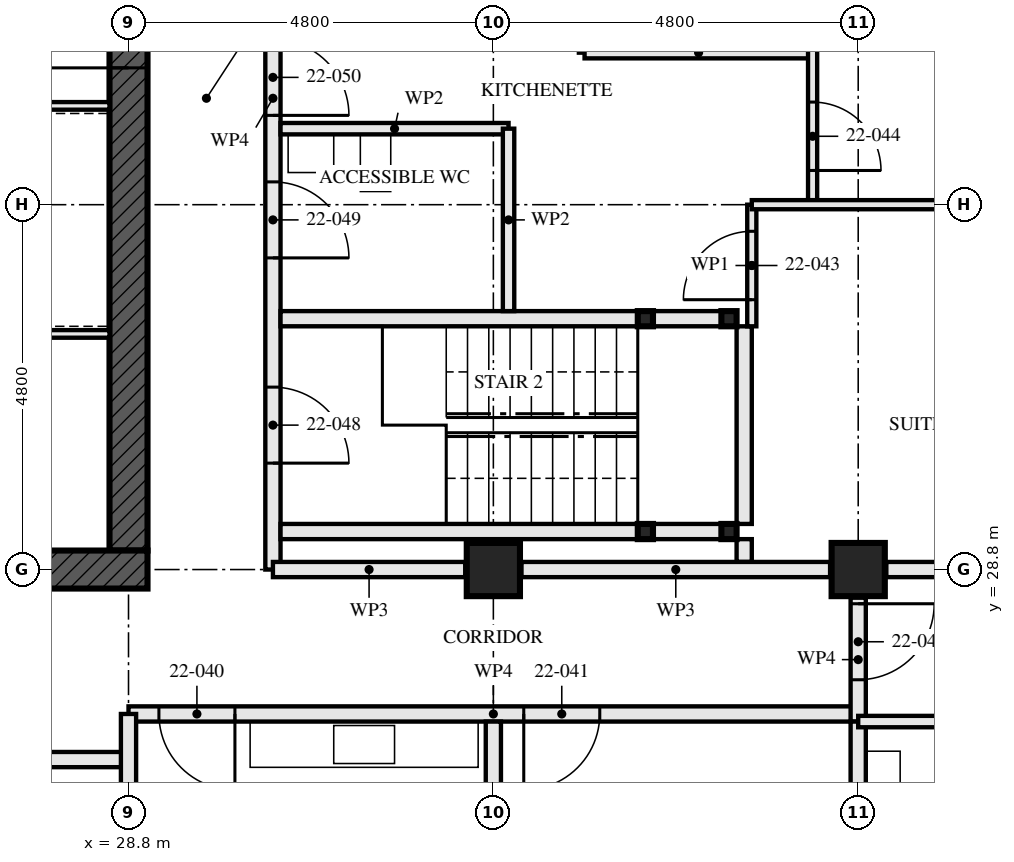
"""IFC4 building model, lengths in metres.
Left out: names, types, materials, properties, quantities, classifications, styles, units other than length and angle.
Written with IfcOpenShell. Run it as: python <this file> out.ifc"""

import sys

from ifc_helpers import new_model, si_unit, direction, frame, frame_2d, origin, origin_2d, place, context, subcontext, project, spatial, rectangle, hollow_rectangle, extrude, element, fill, save


model = new_model("IFC4")
c1 = context("Model", 3, precision=1e-05, world=origin(), true_north=direction((0.0, 1.0)))
c2 = subcontext(c1, "Body", "Model", "MODEL_VIEW")
j1 = project(units=[si_unit("LENGTHUNIT", "METRE"), si_unit("PLANEANGLEUNIT", "RADIAN")], contexts=[c1])
p1 = place(None, origin())
s1 = spatial("IfcSite", under=j1, at=p1, CompositionType="ELEMENT")
p2 = place(p1, origin())
s2 = spatial("IfcBuilding", under=s1, at=p2, CompositionType="ELEMENT")
p3 = place(p2, frame((0.0, 0.0, 84.0)))
s3 = spatial("IfcBuildingStorey", under=s2, at=p3, CompositionType="ELEMENT", Elevation=84.0)
for number, where, z_axis, x_axis in (
    (1, (33.6, 28.8, 0.0), (0.0, 0.0, 1.0), (0.0, 1.0, 0.0)),
    (2, (38.4, 28.8, 0.0), (0.0, 0.0, 1.0), (0.0, 1.0, 0.0)),
):
    element("IfcColumn", number, at=place(p3, frame(where, z_axis=z_axis, x_axis=x_axis)), inside=s3, PredefinedType="COLUMN", context=c2, shape_type="SweptSolid", body=[
        extrude(hollow_rectangle(XDim=0.7, YDim=0.7, WallThickness=0.06, at=origin_2d()), origin(), (0.0, 0.0, 1.0), 3.5),
    ])
p4 = place(p3, frame((14.15, 28.8, -0.17), z_axis=(0.0, 0.0, 1.0), x_axis=(1.0, 0.0, 0.0)))
e3 = element("IfcWall", 3, at=p4, inside=s3, PredefinedType="SHEAR", context=c2, shape_type="SweptSolid", body=[
    extrude(rectangle(XDim=14.9, YDim=0.5, at=frame_2d((7.45, 0.0))), origin(), (0.0, 0.0, 1.0), 3.5),
])
p5 = place(p4, frame((6.85, 0.0, 0.17)))
e4 = element("IfcOpeningElement", 4, at=p5, cuts=e3, PredefinedType="OPENING", context=c2, shape_type="SweptSolid", body=[
    extrude(rectangle(XDim=1.2, YDim=2.1, at=frame_2d((0.6, 1.05))), frame((0.0, 0.26, 0.0), z_axis=(0.0, -1.0, 0.0), x_axis=(1.0, 0.0, 0.0)), (0.0, 0.0, 1.0), 0.521),
])
p6 = place(p3, frame((28.8, 29.05, -0.17), z_axis=(0.0, 0.0, 1.0), x_axis=(0.0, 1.0, 0.0)))
e5 = element("IfcWall", 5, at=p6, inside=s3, PredefinedType="SHEAR", context=c2, shape_type="SweptSolid", body=[
    extrude(rectangle(XDim=13.9, YDim=0.5, at=frame_2d((6.95, 0.0))), origin(), (0.0, 0.0, 1.0), 3.5),
])
p7 = place(p6, frame((6.35, 0.0, 0.17)))
e6 = element("IfcOpeningElement", 6, at=p7, cuts=e5, PredefinedType="OPENING", context=c2, shape_type="SweptSolid", body=[
    extrude(rectangle(XDim=1.2, YDim=2.1, at=frame_2d((0.6, 1.05))), frame((0.0, 0.26, 0.0), z_axis=(0.0, -1.0, 0.0), x_axis=(1.0, 0.0, 0.0)), (0.0, 0.0, 1.0), 0.521),
])
for number, where, z_axis, x_axis in (
    (7, (36.7, 29.3, 0.0), (0.0, 0.0, 1.0), (1.0, 0.0, 0.0)),
    (8, (36.7, 32.1, 0.0), (0.0, 0.0, 1.0), (1.0, 0.0, 0.0)),
    (9, (35.6, 29.3, 0.0), (0.0, 0.0, 1.0), (1.0, 0.0, 0.0)),
    (10, (35.6, 32.1, 0.0), (0.0, 0.0, 1.0), (1.0, 0.0, 0.0)),
):
    element("IfcColumn", number, at=place(p3, frame(where, z_axis=z_axis, x_axis=x_axis)), inside=s3, PredefinedType="COLUMN", context=c2, shape_type="SweptSolid", body=[
        extrude(hollow_rectangle(XDim=0.2, YDim=0.2, WallThickness=0.008, at=origin_2d()), origin(), (0.0, 0.0, 1.0), 3.33),
    ])
p8 = place(p3, frame((17.8, 26.3, 0.0), z_axis=(0.0, 0.0, 1.0), x_axis=(1.0, 0.0, 0.0)))
e11 = element("IfcWall", 11, at=p8, inside=s3, PredefinedType="PARTITIONING", context=c2, shape_type="SweptSolid", body=[
    extrude(rectangle(XDim=11.0, YDim=0.2, at=frame_2d((5.5, 0.0))), origin(), (0.0, 0.0, 1.0), 2.55),
])
p9 = place(p8, frame((0.25, 0.0, 0.0)))
e12 = element("IfcOpeningElement", 12, at=p9, cuts=e11, PredefinedType="OPENING", context=c2, shape_type="SweptSolid", body=[
    extrude(rectangle(XDim=0.9, YDim=2.1, at=frame_2d((0.45, 1.05))), frame((0.0, 0.111, 0.0), z_axis=(0.0, -1.0, 0.0), x_axis=(1.0, 0.0, 0.0)), (0.0, 0.0, 1.0), 0.221),
])
p10 = place(p8, frame((1.8, 0.0, 0.0)))
e13 = element("IfcOpeningElement", 13, at=p10, cuts=e11, PredefinedType="OPENING", context=c2, shape_type="SweptSolid", body=[
    extrude(rectangle(XDim=1.0, YDim=2.1, at=frame_2d((0.5, 1.05))), frame((0.0, 0.111, 0.0), z_axis=(0.0, -1.0, 0.0), x_axis=(1.0, 0.0, 0.0)), (0.0, 0.0, 1.0), 0.221),
])
p11 = place(p8, frame((6.6, 0.0, 0.0)))
e14 = element("IfcOpeningElement", 14, at=p11, cuts=e11, PredefinedType="OPENING", context=c2, shape_type="SweptSolid", body=[
    extrude(rectangle(XDim=1.0, YDim=2.1, at=frame_2d((0.5, 1.05))), frame((0.0, 0.111, 0.0), z_axis=(0.0, -1.0, 0.0), x_axis=(1.0, 0.0, 0.0)), (0.0, 0.0, 1.0), 0.221),
])
p12 = place(p3, frame((33.6, 14.647, 0.0), z_axis=(0.0, 0.0, 1.0), x_axis=(0.0, 1.0, 0.0)))
e15 = element("IfcWall", 15, at=p12, inside=s3, PredefinedType="PARTITIONING", context=c2, shape_type="SweptSolid", body=[
    extrude(rectangle(XDim=12.153, YDim=0.2, at=frame_2d((6.077, 0.0))), origin(), (0.0, 0.0, 1.0), 2.55),
])
p13 = place(p3, frame((38.4, 19.52, 0.0), z_axis=(0.0, 0.0, 1.0), x_axis=(0.0, 1.0, 0.0)))
e16 = element("IfcWall", 16, at=p13, inside=s3, PredefinedType="PARTITIONING", context=c2, shape_type="SweptSolid", body=[
    extrude(rectangle(XDim=7.28, YDim=0.2, at=frame_2d((3.64, 0.0))), origin(), (0.0, 0.0, 1.0), 2.55),
])
p14 = place(p3, frame((38.4, 26.8, 0.0), z_axis=(0.0, 0.0, 1.0), x_axis=(1.0, 0.0, 0.0)))
e17 = element("IfcWall", 17, at=p14, inside=s3, PredefinedType="PARTITIONING", context=c2, shape_type="SweptSolid", body=[
    extrude(rectangle(XDim=2.8, YDim=0.15, at=frame_2d((1.4, 0.0))), origin(), (0.0, 0.0, 1.0), 3.33),
])
p15 = place(p3, frame((28.8, 26.9, 0.0), z_axis=(0.0, 0.0, 1.0), x_axis=(1.0, 0.0, 0.0)))
e18 = element("IfcWall", 18, at=p15, inside=s3, PredefinedType="PARTITIONING", context=c2, shape_type="SweptSolid", body=[
    extrude(rectangle(XDim=9.6, YDim=0.2, at=frame_2d((4.8, 0.0))), origin(), (0.0, 0.0, 1.0), 3.33),
])
p16 = place(p15, frame((0.4, 0.0, 0.0)))
e19 = element("IfcOpeningElement", 19, at=p16, cuts=e18, PredefinedType="OPENING", context=c2, shape_type="SweptSolid", body=[
    extrude(rectangle(XDim=1.0, YDim=2.1, at=frame_2d((0.5, 1.05))), frame((0.0, 0.111, 0.0), z_axis=(0.0, -1.0, 0.0), x_axis=(1.0, 0.0, 0.0)), (0.0, 0.0, 1.0), 0.221),
])
p17 = place(p15, frame((5.2, 0.0, 0.0)))
e20 = element("IfcOpeningElement", 20, at=p17, cuts=e18, PredefinedType="OPENING", context=c2, shape_type="SweptSolid", body=[
    extrude(rectangle(XDim=1.0, YDim=2.1, at=frame_2d((0.5, 1.05))), frame((0.0, 0.111, 0.0), z_axis=(0.0, -1.0, 0.0), x_axis=(1.0, 0.0, 0.0)), (0.0, 0.0, 1.0), 0.221),
])
p18 = place(p3, frame((38.4, 26.8, 0.0), z_axis=(0.0, 0.0, 1.0), x_axis=(0.0, 1.0, 0.0)))
e21 = element("IfcWall", 21, at=p18, inside=s3, PredefinedType="PARTITIONING", context=c2, shape_type="SweptSolid", body=[
    extrude(rectangle(XDim=1.63, YDim=0.2, at=frame_2d((0.815, 0.0))), origin(), (0.0, 0.0, 1.0), 3.33),
])
p19 = place(p18, frame((0.55, 0.0, 0.0)))
e22 = element("IfcOpeningElement", 22, at=p19, cuts=e21, PredefinedType="OPENING", context=c2, shape_type="SweptSolid", body=[
    extrude(rectangle(XDim=1.0, YDim=2.1, at=frame_2d((0.5, 1.05))), frame((0.0, 0.111, 0.0), z_axis=(0.0, -1.0, 0.0), x_axis=(1.0, 0.0, 0.0)), (0.0, 0.0, 1.0), 0.221),
])
p20 = place(p3, frame((36.6, 29.3, 0.0), z_axis=(0.0, 0.0, 1.0), x_axis=(-1.0, 0.0, 0.0)))
e23 = element("IfcWall", 23, at=p20, inside=s3, PredefinedType="SOLIDWALL", context=c2, shape_type="SweptSolid", body=[
    extrude(rectangle(XDim=0.9, YDim=0.2, at=frame_2d((0.45, 0.0))), origin(), (0.0, 0.0, 1.0), 2.99),
])
p21 = place(p3, frame((35.5, 29.3, 0.0), z_axis=(0.0, 0.0, 1.0), x_axis=(-1.0, 0.0, 0.0)))
e24 = element("IfcWall", 24, at=p21, inside=s3, PredefinedType="SOLIDWALL", context=c2, shape_type="SweptSolid", body=[
    extrude(rectangle(XDim=4.7, YDim=0.2, at=frame_2d((2.35, 0.0))), origin(), (0.0, 0.0, 1.0), 2.99),
])
p22 = place(p3, frame((36.6, 32.1, 0.0), z_axis=(0.0, 0.0, 1.0), x_axis=(-1.0, 0.0, 0.0)))
e25 = element("IfcWall", 25, at=p22, inside=s3, PredefinedType="SOLIDWALL", context=c2, shape_type="SweptSolid", body=[
    extrude(rectangle(XDim=0.9, YDim=0.2, at=frame_2d((0.45, 0.0))), origin(), (0.0, 0.0, 1.0), 2.99),
])
p23 = place(p3, frame((35.5, 32.1, 0.0), z_axis=(0.0, 0.0, 1.0), x_axis=(-1.0, 0.0, 0.0)))
e26 = element("IfcWall", 26, at=p23, inside=s3, PredefinedType="SOLIDWALL", context=c2, shape_type="SweptSolid", body=[
    extrude(rectangle(XDim=4.7, YDim=0.2, at=frame_2d((2.35, 0.0))), origin(), (0.0, 0.0, 1.0), 2.99),
])
p24 = place(p3, frame((36.9, 28.9, 0.0), z_axis=(0.0, 0.0, 1.0), x_axis=(0.0, 1.0, 0.0)))
e27 = element("IfcWall", 27, at=p24, inside=s3, PredefinedType="SOLIDWALL", context=c2, shape_type="SweptSolid", body=[
    extrude(rectangle(XDim=0.3, YDim=0.2, at=frame_2d((0.15, 0.0))), origin(), (0.0, 0.0, 1.0), 3.33),
])
p25 = place(p3, frame((36.9, 29.4, 0.0), z_axis=(0.0, 0.0, 1.0), x_axis=(0.0, 1.0, 0.0)))
e28 = element("IfcWall", 28, at=p25, inside=s3, PredefinedType="SOLIDWALL", context=c2, shape_type="SweptSolid", body=[
    extrude(rectangle(XDim=2.6, YDim=0.2, at=frame_2d((1.3, 0.0))), origin(), (0.0, 0.0, 1.0), 3.33),
])
p26 = place(p3, frame((33.8, 32.2, 0.0), z_axis=(0.0, 0.0, 1.0), x_axis=(0.0, 1.0, 0.0)))
e29 = element("IfcWall", 29, at=p26, inside=s3, PredefinedType="PARTITIONING", context=c2, shape_type="SweptSolid", body=[
    extrude(rectangle(XDim=2.4, YDim=0.15, at=frame_2d((1.2, 0.0))), origin(), (0.0, 0.0, 1.0), 2.55),
])
for number, where, z_axis, x_axis in (
    (30, (33.8, 34.6, 0.0), (0.0, 0.0, 1.0), (-1.0, 0.0, 0.0)),
    (31, (37.8, 35.6, 0.0), (0.0, 0.0, 1.0), (-1.0, 0.0, 0.0)),
):
    element("IfcWall", number, at=place(p3, frame(where, z_axis=z_axis, x_axis=x_axis)), inside=s3, PredefinedType="PARTITIONING", context=c2, shape_type="SweptSolid", body=[
        extrude(rectangle(XDim=3.0, YDim=0.15, at=frame_2d((1.5, 0.0))), origin(), (0.0, 0.0, 1.0), 3.33),
    ])
p27 = place(p3, frame((37.0, 32.0, 0.0), z_axis=(0.0, 0.0, 1.0), x_axis=(0.0, 1.0, 0.0)))
e32 = element("IfcWall", 32, at=p27, inside=s3, PredefinedType="PARTITIONING", context=c2, shape_type="SweptSolid", body=[
    extrude(rectangle(XDim=1.6, YDim=0.12, at=frame_2d((0.8, 0.0))), origin(), (0.0, 0.0, 1.0), 3.33),
])
p28 = place(p27, frame((0.35, 0.0, 0.0)))
e33 = element("IfcOpeningElement", 33, at=p28, cuts=e32, PredefinedType="OPENING", context=c2, shape_type="SweptSolid", body=[
    extrude(rectangle(XDim=0.9, YDim=2.1, at=frame_2d((0.45, 1.05))), frame((0.0, 0.071, 0.0), z_axis=(0.0, -1.0, 0.0), x_axis=(1.0, 0.0, 0.0)), (0.0, 0.0, 1.0), 0.141),
])
p29 = place(p3, frame((37.8, 33.6, 0.0), z_axis=(0.0, 0.0, 1.0), x_axis=(0.0, 1.0, 0.0)))
e34 = element("IfcWall", 34, at=p29, inside=s3, PredefinedType="PARTITIONING", context=c2, shape_type="SweptSolid", body=[
    extrude(rectangle(XDim=4.8, YDim=0.12, at=frame_2d((2.4, 0.0))), origin(), (0.0, 0.0, 1.0), 3.33),
])
p30 = place(p29, frame((0.45, 0.0, 0.0)))
e35 = element("IfcOpeningElement", 35, at=p30, cuts=e34, PredefinedType="OPENING", context=c2, shape_type="SweptSolid", body=[
    extrude(rectangle(XDim=0.9, YDim=2.1, at=frame_2d((0.45, 1.05))), frame((0.0, 0.071, 0.0), z_axis=(0.0, -1.0, 0.0), x_axis=(1.0, 0.0, 0.0)), (0.0, 0.0, 1.0), 0.141),
])
p31 = place(p29, frame((2.925, 0.0, 0.0)))
e36 = element("IfcOpeningElement", 36, at=p31, cuts=e34, PredefinedType="OPENING", context=c2, shape_type="SweptSolid", body=[
    extrude(rectangle(XDim=0.95, YDim=2.1, at=frame_2d((0.475, 1.05))), frame((0.0, 0.071, 0.0), z_axis=(0.0, -1.0, 0.0), x_axis=(1.0, 0.0, 0.0)), (0.0, 0.0, 1.0), 0.141),
])
p32 = place(p3, frame((42.855, 33.6, 0.0), z_axis=(0.0, 0.0, 1.0), x_axis=(-1.0, 0.0, 0.0)))
e37 = element("IfcWall", 37, at=p32, inside=s3, PredefinedType="PARTITIONING", context=c2, shape_type="SweptSolid", body=[
    extrude(rectangle(XDim=5.855, YDim=0.12, at=frame_2d((2.927, 0.0))), origin(), (0.0, 0.0, 1.0), 2.55),
])
p33 = place(p3, frame((30.7, 28.8, 0.0), z_axis=(0.0, 0.0, 1.0), x_axis=(0.0, 1.0, 0.0)))
e38 = element("IfcWall", 38, at=p33, inside=s3, PredefinedType="PARTITIONING", context=c2, shape_type="SweptSolid", body=[
    extrude(rectangle(XDim=12.4, YDim=0.2, at=frame_2d((6.2, 0.0))), origin(), (0.0, 0.0, 1.0), 2.55),
])
p34 = place(p33, frame((1.4, 0.0, 0.0)))
e39 = element("IfcOpeningElement", 39, at=p34, cuts=e38, PredefinedType="OPENING", context=c2, shape_type="SweptSolid", body=[
    extrude(rectangle(XDim=1.0, YDim=2.1, at=frame_2d((0.5, 1.05))), frame((0.0, 0.111, 0.0), z_axis=(0.0, -1.0, 0.0), x_axis=(1.0, 0.0, 0.0)), (0.0, 0.0, 1.0), 0.221),
])
p35 = place(p33, frame((4.1, 0.0, 0.0)))
e40 = element("IfcOpeningElement", 40, at=p35, cuts=e38, PredefinedType="OPENING", context=c2, shape_type="SweptSolid", body=[
    extrude(rectangle(XDim=1.0, YDim=2.1, at=frame_2d((0.5, 1.05))), frame((0.0, 0.111, 0.0), z_axis=(0.0, -1.0, 0.0), x_axis=(1.0, 0.0, 0.0)), (0.0, 0.0, 1.0), 0.221),
])
p36 = place(p33, frame((5.975, 0.0, 0.0)))
e41 = element("IfcOpeningElement", 41, at=p36, cuts=e38, PredefinedType="OPENING", context=c2, shape_type="SweptSolid", body=[
    extrude(rectangle(XDim=1.0, YDim=2.1, at=frame_2d((0.5, 1.05))), frame((0.0, 0.111, 0.0), z_axis=(0.0, -1.0, 0.0), x_axis=(1.0, 0.0, 0.0)), (0.0, 0.0, 1.0), 0.221),
])
p37 = place(p3, frame((23.05, 34.9, 0.0), z_axis=(0.0, 0.0, 1.0), x_axis=(1.0, 0.0, 0.0)))
e42 = element("IfcWall", 42, at=p37, inside=s3, PredefinedType="SOLIDWALL", context=c2, shape_type="SweptSolid", body=[
    extrude(rectangle(XDim=5.5, YDim=0.1, at=frame_2d((2.75, 0.0))), origin(), (0.0, 0.0, 1.0), 3.33),
])
p38 = place(p3, frame((23.15, 31.9, 0.0), z_axis=(0.0, 0.0, 1.0), x_axis=(1.0, 0.0, 0.0)))
e43 = element("IfcWall", 43, at=p38, inside=s3, PredefinedType="SOLIDWALL", context=c2, shape_type="SweptSolid", body=[
    extrude(rectangle(XDim=5.4, YDim=0.1, at=frame_2d((2.7, 0.0))), origin(), (0.0, 0.0, 1.0), 3.33),
])
p39 = place(p3, frame((28.8, 24.37, 0.0), z_axis=(0.0, 0.0, 1.0), x_axis=(0.0, 1.0, 0.0)))
e44 = element("IfcWall", 44, at=p39, inside=s3, PredefinedType="PARTITIONING", context=c2, shape_type="SweptSolid", body=[
    extrude(rectangle(XDim=2.53, YDim=0.2, at=frame_2d((1.265, 0.0))), origin(), (0.0, 0.0, 1.0), 2.32),
])
p40 = place(p3, frame((42.896, 28.8, 0.0), z_axis=(0.0, 0.0, 1.0), x_axis=(-1.0, 0.0, 0.0)))
e45 = element("IfcWall", 45, at=p40, inside=s3, PredefinedType="PARTITIONING", context=c2, shape_type="SweptSolid", body=[
    extrude(rectangle(XDim=4.125, YDim=0.2, at=frame_2d((2.063, 0.0))), origin(), (0.0, 0.0, 1.0), 2.32),
])
p41 = place(p3, frame((38.03, 28.8, 0.0), z_axis=(0.0, 0.0, 1.0), x_axis=(-1.0, 0.0, 0.0)))
e46 = element("IfcWall", 46, at=p41, inside=s3, PredefinedType="PARTITIONING", context=c2, shape_type="SweptSolid", body=[
    extrude(rectangle(XDim=4.06, YDim=0.2, at=frame_2d((2.03, 0.0))), origin(), (0.0, 0.0, 1.0), 2.32),
])
p42 = place(p3, frame((33.23, 28.8, 0.0), z_axis=(0.0, 0.0, 1.0), x_axis=(-1.0, 0.0, 0.0)))
e47 = element("IfcWall", 47, at=p42, inside=s3, PredefinedType="PARTITIONING", context=c2, shape_type="SweptSolid", body=[
    extrude(rectangle(XDim=2.53, YDim=0.2, at=frame_2d((1.265, 0.0))), origin(), (0.0, 0.0, 1.0), 2.32),
])
p43 = place(p16, frame((1.0, 0.0, 0.0), z_axis=(0.0, 0.0, 1.0), x_axis=(-1.0, 0.0, 0.0)))
e48 = element("IfcDoor", 48, at=p43, inside=s3, OperationType="SINGLE_SWING_RIGHT", PredefinedType="DOOR", context=c2, shape_type="SweptSolid", body=[
    extrude(rectangle(XDim=1.0, YDim=2.1, at=frame_2d((0.5, 1.05))), frame((0.0, 0.027, 0.0), z_axis=(0.0, -1.0, 0.0), x_axis=(1.0, 0.0, 0.0)), (0.0, 0.0, 1.0), 0.054),
])
fill(e19, e48)
p44 = place(p17, frame((1.0, 0.0, 0.0), z_axis=(0.0, 0.0, 1.0), x_axis=(-1.0, 0.0, 0.0)))
e49 = element("IfcDoor", 49, at=p44, inside=s3, OperationType="SINGLE_SWING_LEFT", PredefinedType="DOOR", context=c2, shape_type="SweptSolid", body=[
    extrude(rectangle(XDim=1.0, YDim=2.1, at=frame_2d((0.5, 1.05))), frame((0.0, 0.027, 0.0), z_axis=(0.0, -1.0, 0.0), x_axis=(1.0, 0.0, 0.0)), (0.0, 0.0, 1.0), 0.054),
])
fill(e20, e49)
p45 = place(p19, frame((1.0, 0.0, 0.0), z_axis=(0.0, 0.0, 1.0), x_axis=(-1.0, 0.0, 0.0)))
e50 = element("IfcDoor", 50, at=p45, inside=s3, OperationType="SINGLE_SWING_RIGHT", PredefinedType="DOOR", context=c2, shape_type="SweptSolid", body=[
    extrude(rectangle(XDim=1.0, YDim=2.1, at=frame_2d((0.5, 1.05))), frame((0.0, 0.027, 0.0), z_axis=(0.0, -1.0, 0.0), x_axis=(1.0, 0.0, 0.0)), (0.0, 0.0, 1.0), 0.054),
])
fill(e22, e50)
p46 = place(p28, origin())
e51 = element("IfcDoor", 51, at=p46, inside=s3, OperationType="SINGLE_SWING_RIGHT", PredefinedType="DOOR", context=c2, shape_type="SweptSolid", body=[
    extrude(rectangle(XDim=0.9, YDim=2.1, at=frame_2d((0.45, 1.05))), frame((0.0, 0.022, 0.0), z_axis=(0.0, -1.0, 0.0), x_axis=(1.0, 0.0, 0.0)), (0.0, 0.0, 1.0), 0.044),
])
fill(e33, e51)
p47 = place(p30, frame((0.9, 0.0, 0.0), z_axis=(0.0, 0.0, 1.0), x_axis=(-1.0, 0.0, 0.0)))
e52 = element("IfcDoor", 52, at=p47, inside=s3, OperationType="SINGLE_SWING_LEFT", PredefinedType="DOOR", context=c2, shape_type="SweptSolid", body=[
    extrude(rectangle(XDim=0.9, YDim=2.1, at=frame_2d((0.45, 1.05))), frame((0.0, 0.022, 0.0), z_axis=(0.0, -1.0, 0.0), x_axis=(1.0, 0.0, 0.0)), (0.0, 0.0, 1.0), 0.044),
])
fill(e35, e52)
p48 = place(p34, frame((1.0, 0.0, 0.0), z_axis=(0.0, 0.0, 1.0), x_axis=(-1.0, 0.0, 0.0)))
e53 = element("IfcDoor", 53, at=p48, inside=s3, OperationType="SINGLE_SWING_LEFT", PredefinedType="DOOR", context=c2, shape_type="SweptSolid", body=[
    extrude(rectangle(XDim=1.0, YDim=2.1, at=frame_2d((0.5, 1.05))), frame((0.0, 0.032, 0.0), z_axis=(0.0, -1.0, 0.0), x_axis=(1.0, 0.0, 0.0)), (0.0, 0.0, 1.0), 0.064),
])
fill(e39, e53)
p49 = place(p35, frame((1.0, 0.0, 0.0), z_axis=(0.0, 0.0, 1.0), x_axis=(-1.0, 0.0, 0.0)))
e54 = element("IfcDoor", 54, at=p49, inside=s3, OperationType="SINGLE_SWING_LEFT", PredefinedType="DOOR", context=c2, shape_type="SweptSolid", body=[
    extrude(rectangle(XDim=1.0, YDim=2.1, at=frame_2d((0.5, 1.05))), frame((0.0, 0.027, 0.0), z_axis=(0.0, -1.0, 0.0), x_axis=(1.0, 0.0, 0.0)), (0.0, 0.0, 1.0), 0.054),
])
fill(e40, e54)
p50 = place(p36, frame((1.0, 0.0, 0.0), z_axis=(0.0, 0.0, 1.0), x_axis=(-1.0, 0.0, 0.0)))
e55 = element("IfcDoor", 55, at=p50, inside=s3, OperationType="SINGLE_SWING_LEFT", PredefinedType="DOOR", context=c2, shape_type="SweptSolid", body=[
    extrude(rectangle(XDim=1.0, YDim=2.1, at=frame_2d((0.5, 1.05))), frame((0.0, 0.027, 0.0), z_axis=(0.0, -1.0, 0.0), x_axis=(1.0, 0.0, 0.0)), (0.0, 0.0, 1.0), 0.054),
])
fill(e41, e55)
p51 = place(p7, origin())
e56 = element("IfcDoor", 56, at=p51, inside=s3, OperationType="SINGLE_SWING_LEFT", PredefinedType="DOOR", context=c2, shape_type="SweptSolid", body=[
    extrude(rectangle(XDim=1.2, YDim=2.1, at=frame_2d((0.6, 1.05))), frame((0.0, 0.027, 0.0), z_axis=(0.0, -1.0, 0.0), x_axis=(1.0, 0.0, 0.0)), (0.0, 0.0, 1.0), 0.054),
])
fill(e6, e56)
save(model, sys.argv[1])
